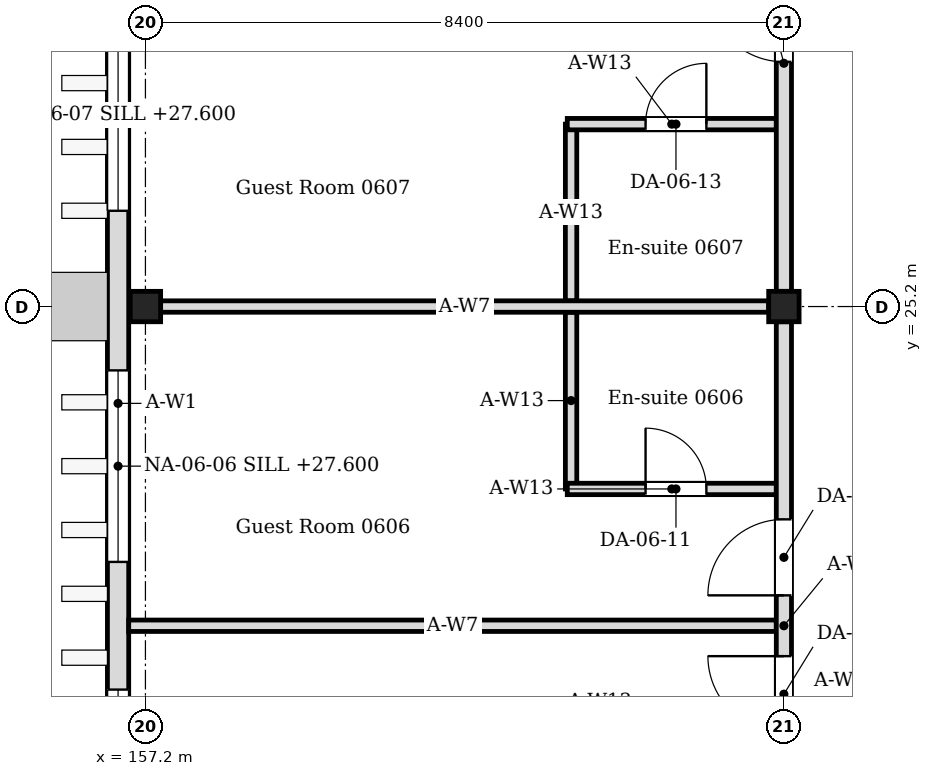
"""IFC4 building model, lengths in metres.
Left out: names, types, materials, properties, quantities, classifications, styles, units other than length and angle.
Written with IfcOpenShell. Run it as: python <this file> out.ifc"""

import sys

from ifc_helpers import new_model, si_unit, direction, frame, frame_2d, origin, origin_2d, place, context, subcontext, project, spatial, rectangle, i_section, extrude, element, fill, save


model = new_model("IFC4")
c1 = context("Model", 3, precision=1e-05, world=origin(), true_north=direction((0.0, 1.0)))
c2 = subcontext(c1, "Body", "Model", "MODEL_VIEW")
j1 = project(units=[si_unit("LENGTHUNIT", "METRE"), si_unit("PLANEANGLEUNIT", "RADIAN")], contexts=[c1])
p1 = place(None, origin())
s1 = spatial("IfcSite", under=j1, at=p1, CompositionType="ELEMENT")
p2 = place(p1, origin())
s2 = spatial("IfcBuilding", under=s1, at=p2, CompositionType="ELEMENT")
p3 = place(p2, frame((0.0, 0.0, 27.0)))
s3 = spatial("IfcBuildingStorey", under=s2, at=p3, CompositionType="ELEMENT", Elevation=27.0)
for number, where, z_axis, x_axis in (
    (1, (157.2, 25.2, 0.0), (0.0, 0.0, 1.0), (1.0, 0.0, 0.0)),
    (2, (165.6, 25.2, 0.0), (0.0, 0.0, 1.0), (1.0, 0.0, 0.0)),
):
    element("IfcColumn", number, at=place(p3, frame(where, z_axis=z_axis, x_axis=x_axis)), inside=s3, PredefinedType="COLUMN", context=c2, shape_type="SweptSolid", body=[
        extrude(i_section(OverallWidth=0.4, OverallDepth=0.4, WebThickness=0.013, FlangeThickness=0.021, FilletRadius=0.022, at=origin_2d()), origin(), (0.0, 0.0, 1.0), 4.2),
    ])
p4 = place(p3, frame((156.84, 16.45, 0.0), z_axis=(0.0, 0.0, 1.0), x_axis=(0.0, 1.0, 0.0)))
e3 = element("IfcWall", 3, at=p4, inside=s3, PredefinedType="SOLIDWALL", context=c2, shape_type="SweptSolid", body=[
    extrude(rectangle(XDim=25.9, YDim=0.28, at=frame_2d((12.95, 0.0))), origin(), (0.0, 0.0, 1.0), 4.05),
])
p5 = place(p4, frame((1.19, 0.0, 0.6)))
e4 = element("IfcOpeningElement", 4, at=p5, cuts=e3, PredefinedType="OPENING", context=c2, shape_type="SweptSolid", body=[
    extrude(rectangle(XDim=2.52, YDim=2.4, at=frame_2d((1.26, 1.2))), frame((0.0, 0.15, 0.0), z_axis=(0.0, -1.0, 0.0), x_axis=(1.0, 0.0, 0.0)), (0.0, 0.0, 1.0), 0.3),
])
p6 = place(p4, frame((5.39, 0.0, 0.6)))
e5 = element("IfcOpeningElement", 5, at=p6, cuts=e3, PredefinedType="OPENING", context=c2, shape_type="SweptSolid", body=[
    extrude(rectangle(XDim=2.52, YDim=2.4, at=frame_2d((1.26, 1.2))), frame((0.0, 0.15, 0.0), z_axis=(0.0, -1.0, 0.0), x_axis=(1.0, 0.0, 0.0)), (0.0, 0.0, 1.0), 0.3),
])
p7 = place(p4, frame((10.01, 0.0, 0.6)))
e6 = element("IfcOpeningElement", 6, at=p7, cuts=e3, PredefinedType="OPENING", context=c2, shape_type="SweptSolid", body=[
    extrude(rectangle(XDim=2.52, YDim=2.4, at=frame_2d((1.26, 1.2))), frame((0.0, 0.15, 0.0), z_axis=(0.0, -1.0, 0.0), x_axis=(1.0, 0.0, 0.0)), (0.0, 0.0, 1.0), 0.3),
])
p8 = place(p4, frame((14.21, 0.0, 0.6)))
e7 = element("IfcOpeningElement", 7, at=p8, cuts=e3, PredefinedType="OPENING", context=c2, shape_type="SweptSolid", body=[
    extrude(rectangle(XDim=2.52, YDim=2.4, at=frame_2d((1.26, 1.2))), frame((0.0, 0.15, 0.0), z_axis=(0.0, -1.0, 0.0), x_axis=(1.0, 0.0, 0.0)), (0.0, 0.0, 1.0), 0.3),
])
p9 = place(p4, frame((17.99, 0.0, 0.6)))
e8 = element("IfcOpeningElement", 8, at=p9, cuts=e3, PredefinedType="OPENING", context=c2, shape_type="SweptSolid", body=[
    extrude(rectangle(XDim=2.52, YDim=2.4, at=frame_2d((1.26, 1.2))), frame((0.0, 0.15, 0.0), z_axis=(0.0, -1.0, 0.0), x_axis=(1.0, 0.0, 0.0)), (0.0, 0.0, 1.0), 0.3),
])
p10 = place(p4, frame((22.19, 0.0, 0.6)))
e9 = element("IfcOpeningElement", 9, at=p10, cuts=e3, PredefinedType="OPENING", context=c2, shape_type="SweptSolid", body=[
    extrude(rectangle(XDim=2.52, YDim=2.4, at=frame_2d((1.26, 1.2))), frame((0.0, 0.15, 0.0), z_axis=(0.0, -1.0, 0.0), x_axis=(1.0, 0.0, 0.0)), (0.0, 0.0, 1.0), 0.3),
])
p11 = place(p3, frame((162.8, 22.8, 0.0), z_axis=(0.0, 0.0, 1.0), x_axis=(0.0, 1.0, 0.0)))
e10 = element("IfcWall", 10, at=p11, inside=s3, PredefinedType="PARTITIONING", context=c2, shape_type="SweptSolid", body=[
    extrude(rectangle(XDim=2.325, YDim=0.15, at=frame_2d((1.163, 0.0))), origin(), (0.0, 0.0, 1.0), 4.05),
])
p12 = place(p3, frame((162.75, 22.8, 0.0), z_axis=(0.0, 0.0, 1.0), x_axis=(1.0, 0.0, 0.0)))
e11 = element("IfcWall", 11, at=p12, inside=s3, PredefinedType="PARTITIONING", context=c2, shape_type="SweptSolid", body=[
    extrude(rectangle(XDim=2.75, YDim=0.15, at=frame_2d((1.375, 0.0))), origin(), (0.0, 0.0, 1.0), 4.05),
])
p13 = place(p12, frame((1.03, 0.0, 0.0)))
e12 = element("IfcOpeningElement", 12, at=p13, cuts=e11, PredefinedType="OPENING", context=c2, shape_type="SweptSolid", body=[
    extrude(rectangle(XDim=0.8, YDim=2.1, at=frame_2d((0.4, 1.05))), frame((0.0, 0.085, 0.0), z_axis=(0.0, -1.0, 0.0), x_axis=(1.0, 0.0, 0.0)), (0.0, 0.0, 1.0), 0.17),
])
p14 = place(p3, frame((162.8, 25.275, 0.0), z_axis=(0.0, 0.0, 1.0), x_axis=(0.0, 1.0, 0.0)))
e13 = element("IfcWall", 13, at=p14, inside=s3, PredefinedType="PARTITIONING", context=c2, shape_type="SweptSolid", body=[
    extrude(rectangle(XDim=2.325, YDim=0.15, at=frame_2d((1.163, 0.0))), origin(), (0.0, 0.0, 1.0), 4.05),
])
p15 = place(p3, frame((162.75, 27.6, 0.0), z_axis=(0.0, 0.0, 1.0), x_axis=(1.0, 0.0, 0.0)))
e14 = element("IfcWall", 14, at=p15, inside=s3, PredefinedType="PARTITIONING", context=c2, shape_type="SweptSolid", body=[
    extrude(rectangle(XDim=2.75, YDim=0.15, at=frame_2d((1.375, 0.0))), origin(), (0.0, 0.0, 1.0), 4.05),
])
p16 = place(p15, frame((1.03, 0.0, 0.0)))
e15 = element("IfcOpeningElement", 15, at=p16, cuts=e14, PredefinedType="OPENING", context=c2, shape_type="SweptSolid", body=[
    extrude(rectangle(XDim=0.8, YDim=2.1, at=frame_2d((0.4, 1.05))), frame((0.0, 0.085, 0.0), z_axis=(0.0, -1.0, 0.0), x_axis=(1.0, 0.0, 0.0)), (0.0, 0.0, 1.0), 0.17),
])
p17 = place(p3, frame((157.4, 25.2, 0.0), z_axis=(0.0, 0.0, 1.0), x_axis=(1.0, 0.0, 0.0)))
e16 = element("IfcWall", 16, at=p17, inside=s3, PredefinedType="PARTITIONING", context=c2, shape_type="SweptSolid", body=[
    extrude(rectangle(XDim=8.0, YDim=0.15, at=frame_2d((4.0, 0.0))), origin(), (0.0, 0.0, 1.0), 3.604),
])
p18 = place(p3, frame((156.98, 21.0, 0.0), z_axis=(0.0, 0.0, 1.0), x_axis=(1.0, 0.0, 0.0)))
e17 = element("IfcWall", 17, at=p18, inside=s3, PredefinedType="PARTITIONING", context=c2, shape_type="SweptSolid", body=[
    extrude(rectangle(XDim=8.52, YDim=0.15, at=frame_2d((4.26, 0.0))), origin(), (0.0, 0.0, 1.0), 3.604),
])
p19 = place(p3, frame((165.6, 17.0, 0.0), z_axis=(0.0, 0.0, 1.0), x_axis=(0.0, 1.0, 0.0)))
e18 = element("IfcWall", 18, at=p19, inside=s3, PredefinedType="PARTITIONING", context=c2, shape_type="SweptSolid", body=[
    extrude(rectangle(XDim=8.0, YDim=0.2, at=frame_2d((4.0, 0.0))), origin(), (0.0, 0.0, 1.0), 3.45),
])
p20 = place(p19, frame((2.6, 0.0, 0.0)))
e19 = element("IfcOpeningElement", 19, at=p20, cuts=e18, PredefinedType="OPENING", context=c2, shape_type="SweptSolid", body=[
    extrude(rectangle(XDim=1.0, YDim=2.4, at=frame_2d((0.5, 1.2))), frame((0.0, 0.11, 0.0), z_axis=(0.0, -1.0, 0.0), x_axis=(1.0, 0.0, 0.0)), (0.0, 0.0, 1.0), 0.22),
])
p21 = place(p19, frame((4.4, 0.0, 0.0)))
e20 = element("IfcOpeningElement", 20, at=p21, cuts=e18, PredefinedType="OPENING", context=c2, shape_type="SweptSolid", body=[
    extrude(rectangle(XDim=1.0, YDim=2.4, at=frame_2d((0.5, 1.2))), frame((0.0, 0.11, 0.0), z_axis=(0.0, -1.0, 0.0), x_axis=(1.0, 0.0, 0.0)), (0.0, 0.0, 1.0), 0.22),
])
p22 = place(p3, frame((165.6, 25.4, 0.0), z_axis=(0.0, 0.0, 1.0), x_axis=(0.0, 1.0, 0.0)))
e21 = element("IfcWall", 21, at=p22, inside=s3, PredefinedType="PARTITIONING", context=c2, shape_type="SweptSolid", body=[
    extrude(rectangle(XDim=8.0, YDim=0.2, at=frame_2d((4.0, 0.0))), origin(), (0.0, 0.0, 1.0), 3.45),
])
p23 = place(p22, frame((3.02, 0.0, 0.0)))
e22 = element("IfcOpeningElement", 22, at=p23, cuts=e21, PredefinedType="OPENING", context=c2, shape_type="SweptSolid", body=[
    extrude(rectangle(XDim=1.0, YDim=2.4, at=frame_2d((0.5, 1.2))), frame((0.0, 0.11, 0.0), z_axis=(0.0, -1.0, 0.0), x_axis=(1.0, 0.0, 0.0)), (0.0, 0.0, 1.0), 0.22),
])
p24 = place(p22, frame((5.02, 0.0, 0.0)))
e23 = element("IfcOpeningElement", 23, at=p24, cuts=e21, PredefinedType="OPENING", context=c2, shape_type="SweptSolid", body=[
    extrude(rectangle(XDim=1.0, YDim=2.4, at=frame_2d((0.5, 1.2))), frame((0.0, 0.11, 0.0), z_axis=(0.0, -1.0, 0.0), x_axis=(1.0, 0.0, 0.0)), (0.0, 0.0, 1.0), 0.22),
])
p25 = place(p5, origin())
e24 = element("IfcWindow", 24, at=p25, inside=s3, PartitioningType="SINGLE_PANEL", PredefinedType="WINDOW", context=c2, shape_type="SweptSolid", body=[
    extrude(rectangle(XDim=2.52, YDim=2.4, at=frame_2d((1.26, 1.2))), frame((0.0, 0.03, 0.0), z_axis=(0.0, -1.0, 0.0), x_axis=(1.0, 0.0, 0.0)), (0.0, 0.0, 1.0), 0.06),
])
fill(e4, e24)
p26 = place(p6, origin())
e25 = element("IfcWindow", 25, at=p26, inside=s3, PartitioningType="SINGLE_PANEL", PredefinedType="WINDOW", context=c2, shape_type="SweptSolid", body=[
    extrude(rectangle(XDim=2.52, YDim=2.4, at=frame_2d((1.26, 1.2))), frame((0.0, 0.03, 0.0), z_axis=(0.0, -1.0, 0.0), x_axis=(1.0, 0.0, 0.0)), (0.0, 0.0, 1.0), 0.06),
])
fill(e5, e25)
p27 = place(p7, origin())
e26 = element("IfcWindow", 26, at=p27, inside=s3, PartitioningType="SINGLE_PANEL", PredefinedType="WINDOW", context=c2, shape_type="SweptSolid", body=[
    extrude(rectangle(XDim=2.52, YDim=2.4, at=frame_2d((1.26, 1.2))), frame((0.0, 0.03, 0.0), z_axis=(0.0, -1.0, 0.0), x_axis=(1.0, 0.0, 0.0)), (0.0, 0.0, 1.0), 0.06),
])
fill(e6, e26)
p28 = place(p20, origin())
e27 = element("IfcDoor", 27, at=p28, inside=s3, OperationType="SINGLE_SWING_RIGHT", PredefinedType="DOOR", context=c2, shape_type="SweptSolid", body=[
    extrude(rectangle(XDim=1.0, YDim=2.4, at=frame_2d((0.5, 1.2))), frame((0.0, 0.025, 0.0), z_axis=(0.0, -1.0, 0.0), x_axis=(1.0, 0.0, 0.0)), (0.0, 0.0, 1.0), 0.05),
])
fill(e19, e27)
p29 = place(p13, origin())
e28 = element("IfcDoor", 28, at=p29, inside=s3, OperationType="SINGLE_SWING_LEFT", PredefinedType="DOOR", context=c2, shape_type="SweptSolid", body=[
    extrude(rectangle(XDim=0.8, YDim=2.1, at=frame_2d((0.4, 1.05))), frame((0.0, 0.025, 0.0), z_axis=(0.0, -1.0, 0.0), x_axis=(1.0, 0.0, 0.0)), (0.0, 0.0, 1.0), 0.05),
])
fill(e12, e28)
p30 = place(p21, origin())
e29 = element("IfcDoor", 29, at=p30, inside=s3, OperationType="SINGLE_SWING_LEFT", PredefinedType="DOOR", context=c2, shape_type="SweptSolid", body=[
    extrude(rectangle(XDim=1.0, YDim=2.4, at=frame_2d((0.5, 1.2))), frame((0.0, 0.025, 0.0), z_axis=(0.0, -1.0, 0.0), x_axis=(1.0, 0.0, 0.0)), (0.0, 0.0, 1.0), 0.05),
])
fill(e20, e29)
p31 = place(p16, origin())
e30 = element("IfcDoor", 30, at=p31, inside=s3, OperationType="SINGLE_SWING_RIGHT", PredefinedType="DOOR", context=c2, shape_type="SweptSolid", body=[
    extrude(rectangle(XDim=0.8, YDim=2.1, at=frame_2d((0.4, 1.05))), frame((0.0, 0.025, 0.0), z_axis=(0.0, -1.0, 0.0), x_axis=(1.0, 0.0, 0.0)), (0.0, 0.0, 1.0), 0.05),
])
fill(e15, e30)
p32 = place(p23, origin())
e31 = element("IfcDoor", 31, at=p32, inside=s3, OperationType="SINGLE_SWING_RIGHT", PredefinedType="DOOR", context=c2, shape_type="SweptSolid", body=[
    extrude(rectangle(XDim=1.0, YDim=2.4, at=frame_2d((0.5, 1.2))), frame((0.0, 0.025, 0.0), z_axis=(0.0, -1.0, 0.0), x_axis=(1.0, 0.0, 0.0)), (0.0, 0.0, 1.0), 0.05),
])
fill(e22, e31)
save(model, sys.argv[1])
